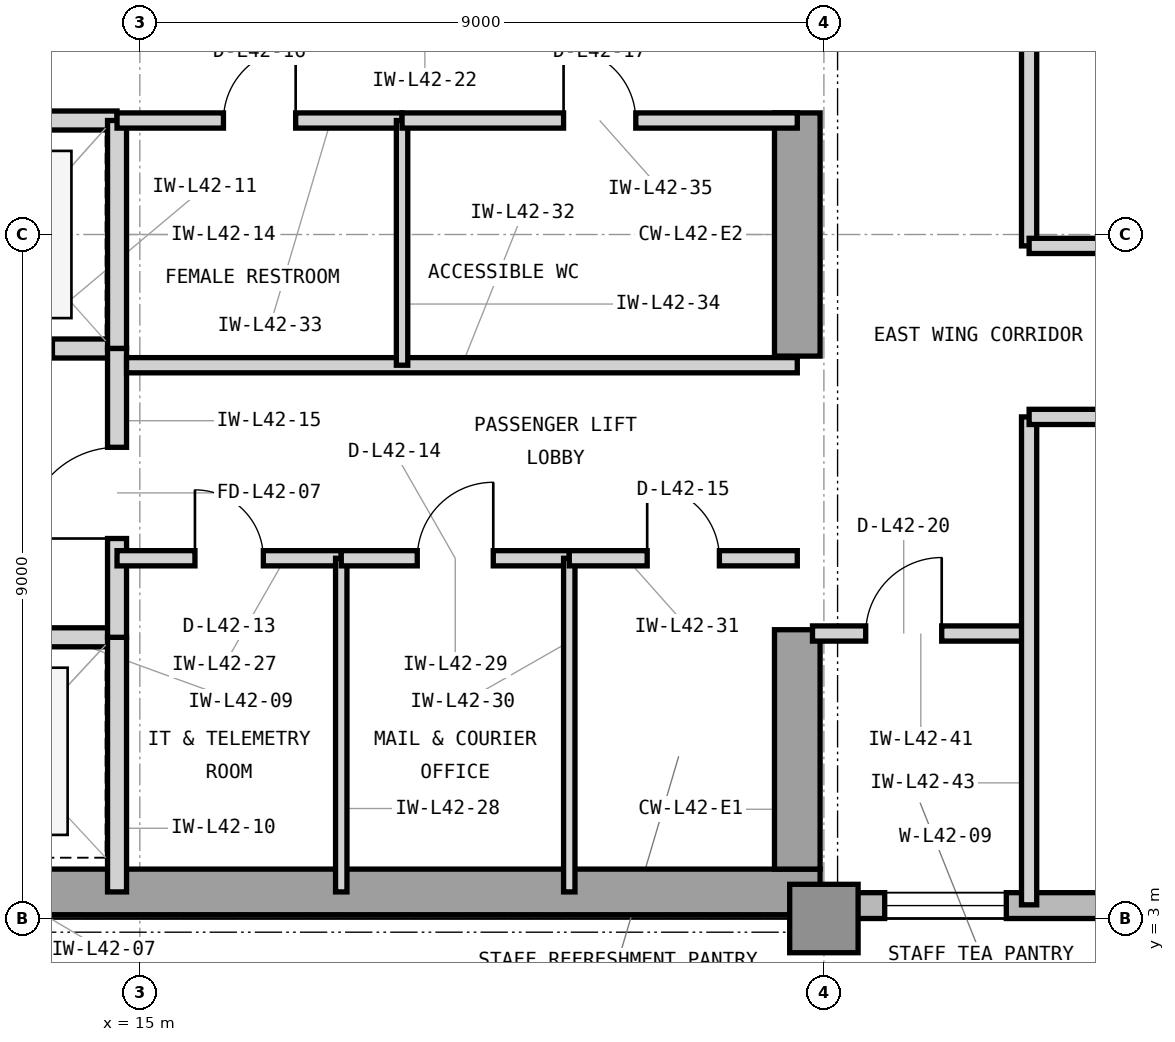
"""IFC4 building model, lengths in metres.
Left out: names, types, materials, properties, quantities, classifications, styles, units other than length and angle.
Written with IfcOpenShell. Run it as: python <this file> out.ifc"""

import sys

from ifc_helpers import new_model, si_unit, direction, frame, frame_2d, origin, origin_2d, place, context, subcontext, project, spatial, rectangle, extrude, element, fill, save


model = new_model("IFC4")
c1 = context("Model", 3, precision=1e-05, world=origin(), true_north=direction((0.0, 1.0)))
c2 = subcontext(c1, "Body", "Model", "MODEL_VIEW")
j1 = project(units=[si_unit("LENGTHUNIT", "METRE"), si_unit("PLANEANGLEUNIT", "RADIAN")], contexts=[c1])
p1 = place(None, origin())
s1 = spatial("IfcSite", under=j1, at=p1, CompositionType="ELEMENT")
p2 = place(p1, origin())
s2 = spatial("IfcBuilding", under=s1, at=p2, CompositionType="ELEMENT")
p3 = place(p2, frame((0.0, 0.0, 176.1)))
s3 = spatial("IfcBuildingStorey", under=s2, at=p3, CompositionType="ELEMENT", Elevation=176.1)
p4 = place(p3, frame((7.475, 3.35, 0.0), z_axis=(0.0, 0.0, 1.0), x_axis=(1.0, 0.0, 0.0)))
e1 = element("IfcWall", 1, at=p4, inside=s3, PredefinedType="SHEAR", context=c2, shape_type="SweptSolid", body=[
    extrude(rectangle(XDim=16.475, YDim=0.6, at=frame_2d((8.237, 0.0))), origin(), (0.0, 0.0, 1.0), 3.9),
])
p5 = place(p3, frame((23.65, 3.65, 0.0), z_axis=(0.0, 0.0, 1.0), x_axis=(0.0, 1.0, 0.0)))
e2 = element("IfcWall", 2, at=p5, inside=s3, PredefinedType="SHEAR", context=c2, shape_type="SweptSolid", body=[
    extrude(rectangle(XDim=3.15, YDim=0.6, at=frame_2d((1.575, 0.0))), origin(), (0.0, 0.0, 1.0), 3.9),
])
p6 = place(p3, frame((23.65, 10.4, 0.0), z_axis=(0.0, 0.0, 1.0), x_axis=(0.0, 1.0, 0.0)))
e3 = element("IfcWall", 3, at=p6, inside=s3, PredefinedType="SHEAR", context=c2, shape_type="SweptSolid", body=[
    extrude(rectangle(XDim=3.2, YDim=0.6, at=frame_2d((1.6, 0.0))), origin(), (0.0, 0.0, 1.0), 3.9),
])
p7 = place(p3, frame((24.0, 3.0, 0.0), z_axis=(0.0, 0.0, 1.0), x_axis=(1.0, 0.0, 0.0)))
e4 = element("IfcColumn", 4, at=p7, inside=s3, PredefinedType="COLUMN", context=c2, shape_type="SweptSolid", body=[
    extrude(rectangle(XDim=0.9, YDim=0.9, at=origin_2d()), origin(), (0.0, 0.0, 1.0), 3.9),
])
p8 = place(p3, frame((23.9, 3.17, 0.0), z_axis=(0.0, 0.0, 1.0), x_axis=(1.0, 0.0, 0.0)))
e5 = element("IfcWall", 5, at=p8, inside=s3, PredefinedType="STANDARD", context=c2, shape_type="SweptSolid", body=[
    extrude(rectangle(XDim=31.5, YDim=0.34, at=frame_2d((15.75, 0.0))), origin(), (0.0, 0.0, 1.0), 3.7),
])
p9 = place(p8, frame((5.6, 0.0, 0.9)))
e6 = element("IfcOpeningElement", 6, at=p9, cuts=e5, PredefinedType="OPENING", context=c2, shape_type="SweptSolid", body=[
    extrude(rectangle(XDim=2.3, YDim=2.2, at=frame_2d((1.15, 1.1))), frame((0.0, 0.18, 0.0), z_axis=(0.0, -1.0, 0.0), x_axis=(1.0, 0.0, 0.0)), (0.0, 0.0, 1.0), 0.36),
])
p10 = place(p8, frame((10.1, 0.0, 0.9)))
e7 = element("IfcOpeningElement", 7, at=p10, cuts=e5, PredefinedType="OPENING", context=c2, shape_type="SweptSolid", body=[
    extrude(rectangle(XDim=2.3, YDim=2.2, at=frame_2d((1.15, 1.1))), frame((0.0, 0.18, 0.0), z_axis=(0.0, -1.0, 0.0), x_axis=(1.0, 0.0, 0.0)), (0.0, 0.0, 1.0), 0.36),
])
p11 = place(p8, frame((19.1, 0.0, 0.9)))
e8 = element("IfcOpeningElement", 8, at=p11, cuts=e5, PredefinedType="OPENING", context=c2, shape_type="SweptSolid", body=[
    extrude(rectangle(XDim=2.3, YDim=2.2, at=frame_2d((1.15, 1.1))), frame((0.0, 0.18, 0.0), z_axis=(0.0, -1.0, 0.0), x_axis=(1.0, 0.0, 0.0)), (0.0, 0.0, 1.0), 0.36),
])
p12 = place(p8, frame((0.9, 0.0, 0.9)))
e9 = element("IfcOpeningElement", 9, at=p12, cuts=e5, PredefinedType="OPENING", context=c2, shape_type="SweptSolid", body=[
    extrude(rectangle(XDim=1.6, YDim=2.2, at=frame_2d((0.8, 1.1))), frame((0.0, 0.18, 0.0), z_axis=(0.0, -1.0, 0.0), x_axis=(1.0, 0.0, 0.0)), (0.0, 0.0, 1.0), 0.36),
])
p13 = place(p3, frame((11.82, 6.7, 0.0), z_axis=(0.0, 0.0, 1.0), x_axis=(1.0, 0.0, 0.0)))
e10 = element("IfcWall", 10, at=p13, inside=s3, PredefinedType="PARTITIONING", context=c2, shape_type="SweptSolid", body=[
    extrude(rectangle(XDim=2.88, YDim=0.25, at=frame_2d((1.44, 0.0))), origin(), (0.0, 0.0, 1.0), 3.283),
])
p14 = place(p13, frame((0.85, 0.0, 0.0)))
e11 = element("IfcOpeningElement", 11, at=p14, cuts=e10, PredefinedType="OPENING", context=c2, shape_type="SweptSolid", body=[
    extrude(rectangle(XDim=1.1, YDim=2.25, at=frame_2d((0.55, 1.125))), frame((0.0, 0.135, 0.0), z_axis=(0.0, -1.0, 0.0), x_axis=(1.0, 0.0, 0.0)), (0.0, 0.0, 1.0), 0.27),
])
p15 = place(p3, frame((14.7, 3.35, 0.0), z_axis=(0.0, 0.0, 1.0), x_axis=(0.0, 1.0, 0.0)))
e12 = element("IfcWall", 12, at=p15, inside=s3, PredefinedType="PARTITIONING", context=c2, shape_type="SweptSolid", body=[
    extrude(rectangle(XDim=3.35, YDim=0.25, at=frame_2d((1.675, 0.0))), origin(), (0.0, 0.0, 1.0), 3.69),
])
p16 = place(p3, frame((11.95, 10.5, 0.0), z_axis=(0.0, 0.0, 1.0), x_axis=(1.0, 0.0, 0.0)))
e13 = element("IfcWall", 13, at=p16, inside=s3, PredefinedType="PARTITIONING", context=c2, shape_type="SweptSolid", body=[
    extrude(rectangle(XDim=2.75, YDim=0.25, at=frame_2d((1.375, 0.0))), origin(), (0.0, 0.0, 1.0), 3.283),
])
p17 = place(p16, frame((0.8, 0.0, 0.0)))
e14 = element("IfcOpeningElement", 14, at=p17, cuts=e13, PredefinedType="OPENING", context=c2, shape_type="SweptSolid", body=[
    extrude(rectangle(XDim=1.1, YDim=2.25, at=frame_2d((0.55, 1.125))), frame((0.0, 0.135, 0.0), z_axis=(0.0, -1.0, 0.0), x_axis=(1.0, 0.0, 0.0)), (0.0, 0.0, 1.0), 0.27),
])
p18 = place(p3, frame((11.95, 13.5, 0.0), z_axis=(0.0, 0.0, 1.0), x_axis=(1.0, 0.0, 0.0)))
e15 = element("IfcWall", 15, at=p18, inside=s3, PredefinedType="PARTITIONING", context=c2, shape_type="SweptSolid", body=[
    extrude(rectangle(XDim=2.75, YDim=0.25, at=frame_2d((1.375, 0.0))), origin(), (0.0, 0.0, 1.0), 3.283),
])
p19 = place(p3, frame((14.7, 10.5, 0.0), z_axis=(0.0, 0.0, 1.0), x_axis=(0.0, 1.0, 0.0)))
e16 = element("IfcWall", 16, at=p19, inside=s3, PredefinedType="PARTITIONING", context=c2, shape_type="SweptSolid", body=[
    extrude(rectangle(XDim=3.0, YDim=0.25, at=frame_2d((1.5, 0.0))), origin(), (0.0, 0.0, 1.0), 3.69),
])
p20 = place(p3, frame((14.7, 6.7, 0.0), z_axis=(0.0, 0.0, 1.0), x_axis=(0.0, 1.0, 0.0)))
e17 = element("IfcWall", 17, at=p20, inside=s3, PredefinedType="PARTITIONING", context=c2, shape_type="SweptSolid", body=[
    extrude(rectangle(XDim=3.8, YDim=0.25, at=frame_2d((1.9, 0.0))), origin(), (0.0, 0.0, 1.0), 3.69),
])
p21 = place(p20, frame((1.3, 0.0, 0.0)))
e18 = element("IfcOpeningElement", 18, at=p21, cuts=e17, PredefinedType="OPENING", context=c2, shape_type="SweptSolid", body=[
    extrude(rectangle(XDim=1.2, YDim=2.2, at=frame_2d((0.6, 1.1))), frame((0.0, 0.135, 0.0), z_axis=(0.0, -1.0, 0.0), x_axis=(1.0, 0.0, 0.0)), (0.0, 0.0, 1.0), 0.27),
])
p22 = place(p3, frame((14.7, 7.74, 0.0), z_axis=(0.0, 0.0, 1.0), x_axis=(1.0, 0.0, 0.0)))
e19 = element("IfcWall", 19, at=p22, inside=s3, PredefinedType="PARTITIONING", context=c2, shape_type="SweptSolid", body=[
    extrude(rectangle(XDim=2.95, YDim=0.2, at=frame_2d((1.475, 0.0))), origin(), (0.0, 0.0, 1.0), 3.69),
])
p23 = place(p22, frame((1.025, 0.0, 0.0)))
e20 = element("IfcOpeningElement", 20, at=p23, cuts=e19, PredefinedType="OPENING", context=c2, shape_type="SweptSolid", body=[
    extrude(rectangle(XDim=0.9, YDim=2.1, at=frame_2d((0.45, 1.05))), frame((0.0, 0.11, 0.0), z_axis=(0.0, -1.0, 0.0), x_axis=(1.0, 0.0, 0.0)), (0.0, 0.0, 1.0), 0.22),
])
p24 = place(p3, frame((17.65, 3.35, 0.0), z_axis=(0.0, 0.0, 1.0), x_axis=(0.0, 1.0, 0.0)))
e21 = element("IfcWall", 21, at=p24, inside=s3, PredefinedType="PARTITIONING", context=c2, shape_type="SweptSolid", body=[
    extrude(rectangle(XDim=4.39, YDim=0.15, at=frame_2d((2.195, 0.0))), origin(), (0.0, 0.0, 1.0), 3.69),
])
p25 = place(p3, frame((17.65, 7.74, 0.0), z_axis=(0.0, 0.0, 1.0), x_axis=(1.0, 0.0, 0.0)))
e22 = element("IfcWall", 22, at=p25, inside=s3, PredefinedType="PARTITIONING", context=c2, shape_type="SweptSolid", body=[
    extrude(rectangle(XDim=3.0, YDim=0.2, at=frame_2d((1.5, 0.0))), origin(), (0.0, 0.0, 1.0), 3.69),
])
p26 = place(p25, frame((1.0, 0.0, 0.0)))
e23 = element("IfcOpeningElement", 23, at=p26, cuts=e22, PredefinedType="OPENING", context=c2, shape_type="SweptSolid", body=[
    extrude(rectangle(XDim=1.0, YDim=2.15, at=frame_2d((0.5, 1.075))), frame((0.0, 0.11, 0.0), z_axis=(0.0, -1.0, 0.0), x_axis=(1.0, 0.0, 0.0)), (0.0, 0.0, 1.0), 0.22),
])
p27 = place(p3, frame((20.65, 3.35, 0.0), z_axis=(0.0, 0.0, 1.0), x_axis=(0.0, 1.0, 0.0)))
e24 = element("IfcWall", 24, at=p27, inside=s3, PredefinedType="PARTITIONING", context=c2, shape_type="SweptSolid", body=[
    extrude(rectangle(XDim=4.39, YDim=0.15, at=frame_2d((2.195, 0.0))), origin(), (0.0, 0.0, 1.0), 3.69),
])
p28 = place(p3, frame((20.65, 7.74, 0.0), z_axis=(0.0, 0.0, 1.0), x_axis=(1.0, 0.0, 0.0)))
e25 = element("IfcWall", 25, at=p28, inside=s3, PredefinedType="PARTITIONING", context=c2, shape_type="SweptSolid", body=[
    extrude(rectangle(XDim=3.0, YDim=0.2, at=frame_2d((1.5, 0.0))), origin(), (0.0, 0.0, 1.0), 3.69),
])
p29 = place(p28, frame((1.025, 0.0, 0.0)))
e26 = element("IfcOpeningElement", 26, at=p29, cuts=e25, PredefinedType="OPENING", context=c2, shape_type="SweptSolid", body=[
    extrude(rectangle(XDim=0.95, YDim=2.1, at=frame_2d((0.475, 1.05))), frame((0.0, 0.11, 0.0), z_axis=(0.0, -1.0, 0.0), x_axis=(1.0, 0.0, 0.0)), (0.0, 0.0, 1.0), 0.22),
])
p30 = place(p3, frame((14.825, 10.28, 0.0), z_axis=(0.0, 0.0, 1.0), x_axis=(1.0, 0.0, 0.0)))
e27 = element("IfcWall", 27, at=p30, inside=s3, PredefinedType="PARTITIONING", context=c2, shape_type="SweptSolid", body=[
    extrude(rectangle(XDim=8.825, YDim=0.2, at=frame_2d((4.413, 0.0))), origin(), (0.0, 0.0, 1.0), 3.69),
])
p31 = place(p3, frame((14.7, 13.5, 0.0), z_axis=(0.0, 0.0, 1.0), x_axis=(1.0, 0.0, 0.0)))
e28 = element("IfcWall", 28, at=p31, inside=s3, PredefinedType="PARTITIONING", context=c2, shape_type="SweptSolid", body=[
    extrude(rectangle(XDim=3.75, YDim=0.2, at=frame_2d((1.875, 0.0))), origin(), (0.0, 0.0, 1.0), 3.283),
])
p32 = place(p31, frame((1.4, 0.0, 0.0)))
e29 = element("IfcOpeningElement", 29, at=p32, cuts=e28, PredefinedType="OPENING", context=c2, shape_type="SweptSolid", body=[
    extrude(rectangle(XDim=0.95, YDim=2.1, at=frame_2d((0.475, 1.05))), frame((0.0, 0.11, 0.0), z_axis=(0.0, -1.0, 0.0), x_axis=(1.0, 0.0, 0.0)), (0.0, 0.0, 1.0), 0.22),
])
p33 = place(p3, frame((18.45, 10.28, 0.0), z_axis=(0.0, 0.0, 1.0), x_axis=(0.0, 1.0, 0.0)))
e30 = element("IfcWall", 30, at=p33, inside=s3, PredefinedType="PARTITIONING", context=c2, shape_type="SweptSolid", body=[
    extrude(rectangle(XDim=3.22, YDim=0.15, at=frame_2d((1.61, 0.0))), origin(), (0.0, 0.0, 1.0), 3.69),
])
p34 = place(p3, frame((18.45, 13.5, 0.0), z_axis=(0.0, 0.0, 1.0), x_axis=(1.0, 0.0, 0.0)))
e31 = element("IfcWall", 31, at=p34, inside=s3, PredefinedType="PARTITIONING", context=c2, shape_type="SweptSolid", body=[
    extrude(rectangle(XDim=5.2, YDim=0.2, at=frame_2d((2.6, 0.0))), origin(), (0.0, 0.0, 1.0), 3.283),
])
p35 = place(p34, frame((2.125, 0.0, 0.0)))
e32 = element("IfcOpeningElement", 32, at=p35, cuts=e31, PredefinedType="OPENING", context=c2, shape_type="SweptSolid", body=[
    extrude(rectangle(XDim=0.95, YDim=2.1, at=frame_2d((0.475, 1.05))), frame((0.0, 0.11, 0.0), z_axis=(0.0, -1.0, 0.0), x_axis=(1.0, 0.0, 0.0)), (0.0, 0.0, 1.0), 0.22),
])
p36 = place(p3, frame((23.85, 6.75, 0.0), z_axis=(0.0, 0.0, 1.0), x_axis=(1.0, 0.0, 0.0)))
e33 = element("IfcWall", 33, at=p36, inside=s3, PredefinedType="PARTITIONING", context=c2, shape_type="SweptSolid", body=[
    extrude(rectangle(XDim=2.85, YDim=0.2, at=frame_2d((1.425, 0.0))), origin(), (0.0, 0.0, 1.0), 3.69),
])
p37 = place(p36, frame((0.7, 0.0, 0.0)))
e34 = element("IfcOpeningElement", 34, at=p37, cuts=e33, PredefinedType="OPENING", context=c2, shape_type="SweptSolid", body=[
    extrude(rectangle(XDim=1.0, YDim=2.15, at=frame_2d((0.5, 1.075))), frame((0.0, 0.11, 0.0), z_axis=(0.0, -1.0, 0.0), x_axis=(1.0, 0.0, 0.0)), (0.0, 0.0, 1.0), 0.22),
])
p38 = place(p3, frame((26.7, 3.18, 0.0), z_axis=(0.0, 0.0, 1.0), x_axis=(0.0, 1.0, 0.0)))
e35 = element("IfcWall", 35, at=p38, inside=s3, PredefinedType="PARTITIONING", context=c2, shape_type="SweptSolid", body=[
    extrude(rectangle(XDim=6.42, YDim=0.2, at=frame_2d((3.21, 0.0))), origin(), (0.0, 0.0, 1.0), 3.69),
])
p39 = place(p3, frame((26.7, 11.85, 0.0), z_axis=(0.0, 0.0, 1.0), x_axis=(0.0, 1.0, 0.0)))
e36 = element("IfcWall", 36, at=p39, inside=s3, PredefinedType="PARTITIONING", context=c2, shape_type="SweptSolid", body=[
    extrude(rectangle(XDim=8.97, YDim=0.2, at=frame_2d((4.485, 0.0))), origin(), (0.0, 0.0, 1.0), 3.69),
])
p40 = place(p3, frame((26.7, 9.6, 0.0), z_axis=(0.0, 0.0, 1.0), x_axis=(1.0, 0.0, 0.0)))
e37 = element("IfcWall", 37, at=p40, inside=s3, PredefinedType="PARTITIONING", context=c2, shape_type="SweptSolid", body=[
    extrude(rectangle(XDim=12.0, YDim=0.2, at=frame_2d((6.0, 0.0))), origin(), (0.0, 0.0, 1.0), 3.69),
])
p41 = place(p40, frame((5.5, 0.0, 0.0)))
e38 = element("IfcOpeningElement", 38, at=p41, cuts=e37, PredefinedType="OPENING", context=c2, shape_type="SweptSolid", body=[
    extrude(rectangle(XDim=1.0, YDim=2.15, at=frame_2d((0.5, 1.075))), frame((0.0, 0.11, 0.0), z_axis=(0.0, -1.0, 0.0), x_axis=(1.0, 0.0, 0.0)), (0.0, 0.0, 1.0), 0.22),
])
p42 = place(p3, frame((26.7, 11.85, 0.0), z_axis=(0.0, 0.0, 1.0), x_axis=(1.0, 0.0, 0.0)))
e39 = element("IfcWall", 39, at=p42, inside=s3, PredefinedType="PARTITIONING", context=c2, shape_type="SweptSolid", body=[
    extrude(rectangle(XDim=7.0, YDim=0.2, at=frame_2d((3.5, 0.0))), origin(), (0.0, 0.0, 1.0), 3.69),
])
p43 = place(p42, frame((3.0, 0.0, 0.0)))
e40 = element("IfcOpeningElement", 40, at=p43, cuts=e39, PredefinedType="OPENING", context=c2, shape_type="SweptSolid", body=[
    extrude(rectangle(XDim=1.0, YDim=2.15, at=frame_2d((0.5, 1.075))), frame((0.0, 0.11, 0.0), z_axis=(0.0, -1.0, 0.0), x_axis=(1.0, 0.0, 0.0)), (0.0, 0.0, 1.0), 0.22),
])
p44 = place(p21, origin())
e41 = element("IfcDoor", 41, at=p44, inside=s3, OperationType="SINGLE_SWING_LEFT", PredefinedType="DOOR", context=c2, shape_type="SweptSolid", body=[
    extrude(rectangle(XDim=1.2, YDim=2.2, at=frame_2d((0.6, 1.1))), frame((0.0, 0.025, 0.0), z_axis=(0.0, -1.0, 0.0), x_axis=(1.0, 0.0, 0.0)), (0.0, 0.0, 1.0), 0.05),
])
fill(e18, e41)
p45 = place(p23, origin())
e42 = element("IfcDoor", 42, at=p45, inside=s3, OperationType="SINGLE_SWING_LEFT", PredefinedType="TRAPDOOR", context=c2, shape_type="SweptSolid", body=[
    extrude(rectangle(XDim=0.9, YDim=2.1, at=frame_2d((0.45, 1.05))), frame((0.0, 0.025, 0.0), z_axis=(0.0, -1.0, 0.0), x_axis=(1.0, 0.0, 0.0)), (0.0, 0.0, 1.0), 0.05),
])
fill(e20, e42)
p46 = place(p26, origin())
e43 = element("IfcDoor", 43, at=p46, inside=s3, OperationType="SINGLE_SWING_RIGHT", PredefinedType="DOOR", context=c2, shape_type="SweptSolid", body=[
    extrude(rectangle(XDim=1.0, YDim=2.15, at=frame_2d((0.5, 1.075))), frame((0.0, 0.025, 0.0), z_axis=(0.0, -1.0, 0.0), x_axis=(1.0, 0.0, 0.0)), (0.0, 0.0, 1.0), 0.05),
])
fill(e23, e43)
p47 = place(p29, origin())
e44 = element("IfcDoor", 44, at=p47, inside=s3, OperationType="SINGLE_SWING_LEFT", PredefinedType="DOOR", context=c2, shape_type="SweptSolid", body=[
    extrude(rectangle(XDim=0.95, YDim=2.1, at=frame_2d((0.475, 1.05))), frame((0.0, 0.025, 0.0), z_axis=(0.0, -1.0, 0.0), x_axis=(1.0, 0.0, 0.0)), (0.0, 0.0, 1.0), 0.05),
])
fill(e26, e44)
p48 = place(p32, origin())
e45 = element("IfcDoor", 45, at=p48, inside=s3, OperationType="SINGLE_SWING_RIGHT", PredefinedType="DOOR", context=c2, shape_type="SweptSolid", body=[
    extrude(rectangle(XDim=0.95, YDim=2.1, at=frame_2d((0.475, 1.05))), frame((0.0, 0.025, 0.0), z_axis=(0.0, -1.0, 0.0), x_axis=(1.0, 0.0, 0.0)), (0.0, 0.0, 1.0), 0.05),
])
fill(e29, e45)
p49 = place(p35, origin())
e46 = element("IfcDoor", 46, at=p49, inside=s3, OperationType="SINGLE_SWING_LEFT", PredefinedType="DOOR", context=c2, shape_type="SweptSolid", body=[
    extrude(rectangle(XDim=0.95, YDim=2.1, at=frame_2d((0.475, 1.05))), frame((0.0, 0.025, 0.0), z_axis=(0.0, -1.0, 0.0), x_axis=(1.0, 0.0, 0.0)), (0.0, 0.0, 1.0), 0.05),
])
fill(e32, e46)
p50 = place(p37, origin())
e47 = element("IfcDoor", 47, at=p50, inside=s3, OperationType="SINGLE_SWING_RIGHT", PredefinedType="DOOR", context=c2, shape_type="SweptSolid", body=[
    extrude(rectangle(XDim=1.0, YDim=2.15, at=frame_2d((0.5, 1.075))), frame((0.0, 0.025, 0.0), z_axis=(0.0, -1.0, 0.0), x_axis=(1.0, 0.0, 0.0)), (0.0, 0.0, 1.0), 0.05),
])
fill(e34, e47)
p51 = place(p12, origin())
e48 = element("IfcWindow", 48, at=p51, inside=s3, PartitioningType="SINGLE_PANEL", PredefinedType="WINDOW", context=c2, shape_type="SweptSolid", body=[
    extrude(rectangle(XDim=1.6, YDim=2.2, at=frame_2d((0.8, 1.1))), frame((0.0, 0.11, 0.0), z_axis=(0.0, -1.0, 0.0), x_axis=(1.0, 0.0, 0.0)), (0.0, 0.0, 1.0), 0.06),
])
fill(e9, e48)
save(model, sys.argv[1])
